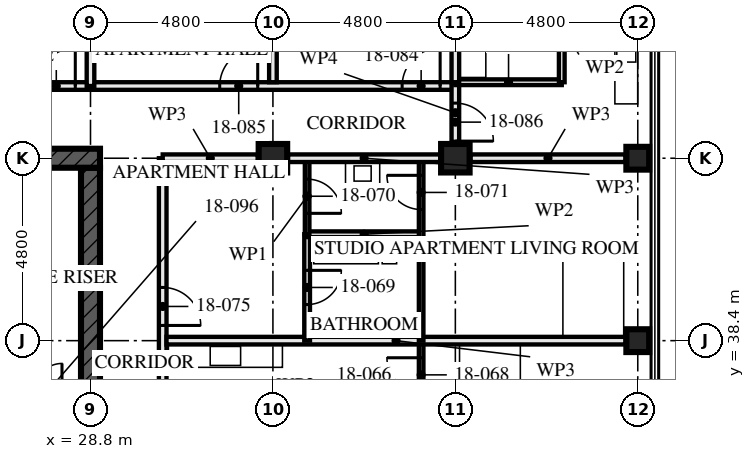
"""IFC4 building model, lengths in metres.
Left out: names, types, materials, properties, quantities, classifications, styles, units other than length and angle.
Written with IfcOpenShell. Run it as: python <this file> out.ifc"""

import sys

from ifc_helpers import new_model, si_unit, direction, frame, frame_2d, origin, origin_2d, place, context, subcontext, project, spatial, rectangle, hollow_rectangle, extrude, element, fill, save


model = new_model("IFC4")
c1 = context("Model", 3, precision=1e-05, world=origin(), true_north=direction((0.0, 1.0)))
c2 = subcontext(c1, "Body", "Model", "MODEL_VIEW")
j1 = project(units=[si_unit("LENGTHUNIT", "METRE"), si_unit("PLANEANGLEUNIT", "RADIAN")], contexts=[c1])
p1 = place(None, origin())
s1 = spatial("IfcSite", under=j1, at=p1, CompositionType="ELEMENT")
p2 = place(p1, origin())
s2 = spatial("IfcBuilding", under=s1, at=p2, CompositionType="ELEMENT")
p3 = place(p2, frame((0.0, 0.0, 69.0)))
s3 = spatial("IfcBuildingStorey", under=s2, at=p3, CompositionType="ELEMENT", Elevation=69.0)
for number, where, z_axis, x_axis in (
    (1, (33.6, 43.2, 0.0), (0.0, 0.0, 1.0), (0.0, 1.0, 0.0)),
    (2, (38.4, 43.2, 0.0), (0.0, 0.0, 1.0), (0.0, 1.0, 0.0)),
):
    element("IfcColumn", number, at=place(p3, frame(where, z_axis=z_axis, x_axis=x_axis)), inside=s3, PredefinedType="COLUMN", context=c2, shape_type="SweptSolid", body=[
        extrude(hollow_rectangle(XDim=0.75, YDim=0.75, WallThickness=0.08, at=origin_2d()), origin(), (0.0, 0.0, 1.0), 3.5),
    ])
for number, where, z_axis, x_axis in (
    (3, (43.2, 38.4, 0.0), (0.0, 0.0, 1.0), (1.0, 0.0, 0.0)),
    (4, (43.2, 43.2, 0.0), (0.0, 0.0, 1.0), (0.0, 1.0, 0.0)),
):
    element("IfcColumn", number, at=place(p3, frame(where, z_axis=z_axis, x_axis=x_axis)), inside=s3, PredefinedType="COLUMN", context=c2, shape_type="SweptSolid", body=[
        extrude(hollow_rectangle(XDim=0.6, YDim=0.6, WallThickness=0.08, at=origin_2d()), origin(), (0.0, 0.0, 1.0), 3.5),
    ])
p4 = place(p3, frame((29.05, 43.2, -0.17), z_axis=(0.0, 0.0, 1.0), x_axis=(-1.0, 0.0, 0.0)))
e5 = element("IfcWall", 5, at=p4, inside=s3, PredefinedType="SHEAR", context=c2, shape_type="SweptSolid", body=[
    extrude(rectangle(XDim=14.9, YDim=0.5, at=frame_2d((7.45, 0.0))), origin(), (0.0, 0.0, 1.0), 3.5),
])
p5 = place(p4, frame((6.85, 0.0, 0.17)))
e6 = element("IfcOpeningElement", 6, at=p5, cuts=e5, PredefinedType="OPENING", context=c2, shape_type="SweptSolid", body=[
    extrude(rectangle(XDim=1.2, YDim=2.1, at=frame_2d((0.6, 1.05))), frame((0.0, 0.26, 0.0), z_axis=(0.0, -1.0, 0.0), x_axis=(1.0, 0.0, 0.0)), (0.0, 0.0, 1.0), 0.521),
])
p6 = place(p3, frame((28.8, 29.05, -0.17), z_axis=(0.0, 0.0, 1.0), x_axis=(0.0, 1.0, 0.0)))
e7 = element("IfcWall", 7, at=p6, inside=s3, PredefinedType="SHEAR", context=c2, shape_type="SweptSolid", body=[
    extrude(rectangle(XDim=13.9, YDim=0.5, at=frame_2d((6.95, 0.0))), origin(), (0.0, 0.0, 1.0), 3.5),
])
p7 = place(p6, frame((6.35, 0.0, 0.17)))
e8 = element("IfcOpeningElement", 8, at=p7, cuts=e7, PredefinedType="OPENING", context=c2, shape_type="SweptSolid", body=[
    extrude(rectangle(XDim=1.2, YDim=2.1, at=frame_2d((0.6, 1.05))), frame((0.0, 0.26, 0.0), z_axis=(0.0, -1.0, 0.0), x_axis=(1.0, 0.0, 0.0)), (0.0, 0.0, 1.0), 0.521),
])
p8 = place(p3, frame((28.8, 45.1, 0.0), z_axis=(0.0, 0.0, 1.0), x_axis=(-1.0, 0.0, 0.0)))
e9 = element("IfcWall", 9, at=p8, inside=s3, PredefinedType="PARTITIONING", context=c2, shape_type="SweptSolid", body=[
    extrude(rectangle(XDim=14.4, YDim=0.2, at=frame_2d((7.2, 0.0))), origin(), (0.0, 0.0, 1.0), 3.33),
])
p9 = place(p8, frame((0.4, 0.0, 0.0)))
e10 = element("IfcOpeningElement", 10, at=p9, cuts=e9, PredefinedType="OPENING", context=c2, shape_type="SweptSolid", body=[
    extrude(rectangle(XDim=1.0, YDim=2.1, at=frame_2d((0.5, 1.05))), frame((0.0, 0.111, 0.0), z_axis=(0.0, -1.0, 0.0), x_axis=(1.0, 0.0, 0.0)), (0.0, 0.0, 1.0), 0.221),
])
p10 = place(p8, frame((5.2, 0.0, 0.0)))
e11 = element("IfcOpeningElement", 11, at=p10, cuts=e9, PredefinedType="OPENING", context=c2, shape_type="SweptSolid", body=[
    extrude(rectangle(XDim=1.0, YDim=2.1, at=frame_2d((0.5, 1.05))), frame((0.0, 0.111, 0.0), z_axis=(0.0, -1.0, 0.0), x_axis=(1.0, 0.0, 0.0)), (0.0, 0.0, 1.0), 0.221),
])
p11 = place(p8, frame((10.0, 0.0, 0.0)))
e12 = element("IfcOpeningElement", 12, at=p11, cuts=e9, PredefinedType="OPENING", context=c2, shape_type="SweptSolid", body=[
    extrude(rectangle(XDim=1.0, YDim=2.1, at=frame_2d((0.5, 1.05))), frame((0.0, 0.111, 0.0), z_axis=(0.0, -1.0, 0.0), x_axis=(1.0, 0.0, 0.0)), (0.0, 0.0, 1.0), 0.221),
])
p12 = place(p3, frame((37.5, 33.6, 0.0), z_axis=(0.0, 0.0, 1.0), x_axis=(0.0, 1.0, 0.0)))
e13 = element("IfcWall", 13, at=p12, inside=s3, PredefinedType="PARTITIONING", context=c2, shape_type="SweptSolid", body=[
    extrude(rectangle(XDim=4.8, YDim=0.12, at=frame_2d((2.4, 0.0))), origin(), (0.0, 0.0, 1.0), 3.33),
])
p13 = place(p12, frame((3.45, 0.0, 0.0)))
e14 = element("IfcOpeningElement", 14, at=p13, cuts=e13, PredefinedType="OPENING", context=c2, shape_type="SweptSolid", body=[
    extrude(rectangle(XDim=0.9, YDim=2.1, at=frame_2d((0.45, 1.05))), frame((0.0, 0.071, 0.0), z_axis=(0.0, -1.0, 0.0), x_axis=(1.0, 0.0, 0.0)), (0.0, 0.0, 1.0), 0.141),
])
p14 = place(p3, frame((42.88, 38.4, 0.0), z_axis=(0.0, 0.0, 1.0), x_axis=(-1.0, 0.0, 0.0)))
e15 = element("IfcWall", 15, at=p14, inside=s3, PredefinedType="PARTITIONING", context=c2, shape_type="SweptSolid", body=[
    extrude(rectangle(XDim=12.08, YDim=0.2, at=frame_2d((6.04, 0.0))), origin(), (0.0, 0.0, 1.0), 2.55),
])
p15 = place(p3, frame((37.5, 41.2, 0.0), z_axis=(0.0, 0.0, 1.0), x_axis=(-1.0, 0.0, 0.0)))
e16 = element("IfcWall", 16, at=p15, inside=s3, PredefinedType="PARTITIONING", context=c2, shape_type="SweptSolid", body=[
    extrude(rectangle(XDim=3.0, YDim=0.15, at=frame_2d((1.5, 0.0))), origin(), (0.0, 0.0, 1.0), 3.33),
])
p16 = place(p3, frame((34.5, 38.4, 0.0), z_axis=(0.0, 0.0, 1.0), x_axis=(0.0, 1.0, 0.0)))
e17 = element("IfcWall", 17, at=p16, inside=s3, PredefinedType="PARTITIONING", context=c2, shape_type="SweptSolid", body=[
    extrude(rectangle(XDim=2.8, YDim=0.15, at=frame_2d((1.4, 0.0))), origin(), (0.0, 0.0, 1.0), 3.33),
])
p17 = place(p16, frame((0.95, 0.0, 0.0)))
e18 = element("IfcOpeningElement", 18, at=p17, cuts=e17, PredefinedType="OPENING", context=c2, shape_type="SweptSolid", body=[
    extrude(rectangle(XDim=0.9, YDim=2.1, at=frame_2d((0.45, 1.05))), frame((0.0, 0.085, 0.0), z_axis=(0.0, -1.0, 0.0), x_axis=(1.0, 0.0, 0.0)), (0.0, 0.0, 1.0), 0.171),
])
p18 = place(p3, frame((34.5, 41.2, 0.0), z_axis=(0.0, 0.0, 1.0), x_axis=(0.0, 1.0, 0.0)))
e19 = element("IfcWall", 19, at=p18, inside=s3, PredefinedType="PARTITIONING", context=c2, shape_type="SweptSolid", body=[
    extrude(rectangle(XDim=2.0, YDim=0.12, at=frame_2d((1.0, 0.0))), origin(), (0.0, 0.0, 1.0), 3.33),
])
p19 = place(p18, frame((0.55, 0.0, 0.0)))
e20 = element("IfcOpeningElement", 20, at=p19, cuts=e19, PredefinedType="OPENING", context=c2, shape_type="SweptSolid", body=[
    extrude(rectangle(XDim=0.9, YDim=2.1, at=frame_2d((0.45, 1.05))), frame((0.0, 0.071, 0.0), z_axis=(0.0, -1.0, 0.0), x_axis=(1.0, 0.0, 0.0)), (0.0, 0.0, 1.0), 0.141),
])
p20 = place(p3, frame((37.5, 38.4, 0.0), z_axis=(0.0, 0.0, 1.0), x_axis=(0.0, 1.0, 0.0)))
e21 = element("IfcWall", 21, at=p20, inside=s3, PredefinedType="PARTITIONING", context=c2, shape_type="SweptSolid", body=[
    extrude(rectangle(XDim=4.8, YDim=0.12, at=frame_2d((2.4, 0.0))), origin(), (0.0, 0.0, 1.0), 3.33),
])
p21 = place(p20, frame((3.45, 0.0, 0.0)))
e22 = element("IfcOpeningElement", 22, at=p21, cuts=e21, PredefinedType="OPENING", context=c2, shape_type="SweptSolid", body=[
    extrude(rectangle(XDim=0.9, YDim=2.1, at=frame_2d((0.45, 1.05))), frame((0.0, 0.071, 0.0), z_axis=(0.0, -1.0, 0.0), x_axis=(1.0, 0.0, 0.0)), (0.0, 0.0, 1.0), 0.141),
])
p22 = place(p3, frame((30.7, 28.8, 0.0), z_axis=(0.0, 0.0, 1.0), x_axis=(0.0, 1.0, 0.0)))
e23 = element("IfcWall", 23, at=p22, inside=s3, PredefinedType="PARTITIONING", context=c2, shape_type="SweptSolid", body=[
    extrude(rectangle(XDim=14.4, YDim=0.2, at=frame_2d((7.2, 0.0))), origin(), (0.0, 0.0, 1.0), 2.55),
])
p23 = place(p22, frame((1.4, 0.0, 0.0)))
e24 = element("IfcOpeningElement", 24, at=p23, cuts=e23, PredefinedType="OPENING", context=c2, shape_type="SweptSolid", body=[
    extrude(rectangle(XDim=1.0, YDim=2.1, at=frame_2d((0.5, 1.05))), frame((0.0, 0.111, 0.0), z_axis=(0.0, -1.0, 0.0), x_axis=(1.0, 0.0, 0.0)), (0.0, 0.0, 1.0), 0.221),
])
p24 = place(p22, frame((4.1, 0.0, 0.0)))
e25 = element("IfcOpeningElement", 25, at=p24, cuts=e23, PredefinedType="OPENING", context=c2, shape_type="SweptSolid", body=[
    extrude(rectangle(XDim=1.0, YDim=2.1, at=frame_2d((0.5, 1.05))), frame((0.0, 0.111, 0.0), z_axis=(0.0, -1.0, 0.0), x_axis=(1.0, 0.0, 0.0)), (0.0, 0.0, 1.0), 0.221),
])
p25 = place(p22, frame((5.975, 0.0, 0.0)))
e26 = element("IfcOpeningElement", 26, at=p25, cuts=e23, PredefinedType="OPENING", context=c2, shape_type="SweptSolid", body=[
    extrude(rectangle(XDim=1.0, YDim=2.1, at=frame_2d((0.5, 1.05))), frame((0.0, 0.111, 0.0), z_axis=(0.0, -1.0, 0.0), x_axis=(1.0, 0.0, 0.0)), (0.0, 0.0, 1.0), 0.221),
])
p26 = place(p22, frame((10.0, 0.0, 0.0)))
e27 = element("IfcOpeningElement", 27, at=p26, cuts=e23, PredefinedType="OPENING", context=c2, shape_type="SweptSolid", body=[
    extrude(rectangle(XDim=1.0, YDim=2.1, at=frame_2d((0.5, 1.05))), frame((0.0, 0.111, 0.0), z_axis=(0.0, -1.0, 0.0), x_axis=(1.0, 0.0, 0.0)), (0.0, 0.0, 1.0), 0.221),
])
p27 = place(p3, frame((41.2, 48.2, 0.0), z_axis=(0.0, 0.0, 1.0), x_axis=(0.0, -1.0, 0.0)))
e28 = element("IfcWall", 28, at=p27, inside=s3, PredefinedType="PARTITIONING", context=c2, shape_type="SweptSolid", body=[
    extrude(rectangle(XDim=3.0, YDim=0.15, at=frame_2d((1.5, 0.0))), origin(), (0.0, 0.0, 1.0), 2.55),
])
p28 = place(p27, frame((1.05, 0.0, 0.0)))
e29 = element("IfcOpeningElement", 29, at=p28, cuts=e28, PredefinedType="OPENING", context=c2, shape_type="SweptSolid", body=[
    extrude(rectangle(XDim=0.9, YDim=2.1, at=frame_2d((0.45, 1.05))), frame((0.0, 0.085, 0.0), z_axis=(0.0, -1.0, 0.0), x_axis=(1.0, 0.0, 0.0)), (0.0, 0.0, 1.0), 0.171),
])
p29 = place(p3, frame((41.2, 45.2, 0.0), z_axis=(0.0, 0.0, 1.0), x_axis=(-1.0, 0.0, 0.0)))
e30 = element("IfcWall", 30, at=p29, inside=s3, PredefinedType="PARTITIONING", context=c2, shape_type="SweptSolid", body=[
    extrude(rectangle(XDim=2.8, YDim=0.15, at=frame_2d((1.4, 0.0))), origin(), (0.0, 0.0, 1.0), 3.33),
])
p30 = place(p3, frame((38.4, 52.48, 0.0), z_axis=(0.0, 0.0, 1.0), x_axis=(0.0, -1.0, 0.0)))
e31 = element("IfcWall", 31, at=p30, inside=s3, PredefinedType="PARTITIONING", context=c2, shape_type="SweptSolid", body=[
    extrude(rectangle(XDim=7.28, YDim=0.2, at=frame_2d((3.64, 0.0))), origin(), (0.0, 0.0, 1.0), 2.55),
])
p31 = place(p3, frame((33.6, 57.28, 0.0), z_axis=(0.0, 0.0, 1.0), x_axis=(0.0, -1.0, 0.0)))
e32 = element("IfcWall", 32, at=p31, inside=s3, PredefinedType="PARTITIONING", context=c2, shape_type="SweptSolid", body=[
    extrude(rectangle(XDim=12.08, YDim=0.2, at=frame_2d((6.04, 0.0))), origin(), (0.0, 0.0, 1.0), 2.55),
])
p32 = place(p3, frame((38.4, 45.1, 0.0), z_axis=(0.0, 0.0, 1.0), x_axis=(-1.0, 0.0, 0.0)))
e33 = element("IfcWall", 33, at=p32, inside=s3, PredefinedType="PARTITIONING", context=c2, shape_type="SweptSolid", body=[
    extrude(rectangle(XDim=9.6, YDim=0.2, at=frame_2d((4.8, 0.0))), origin(), (0.0, 0.0, 1.0), 3.33),
])
p33 = place(p32, frame((0.4, 0.0, 0.0)))
e34 = element("IfcOpeningElement", 34, at=p33, cuts=e33, PredefinedType="OPENING", context=c2, shape_type="SweptSolid", body=[
    extrude(rectangle(XDim=1.0, YDim=2.1, at=frame_2d((0.5, 1.05))), frame((0.0, 0.111, 0.0), z_axis=(0.0, -1.0, 0.0), x_axis=(1.0, 0.0, 0.0)), (0.0, 0.0, 1.0), 0.221),
])
p34 = place(p32, frame((5.2, 0.0, 0.0)))
e35 = element("IfcOpeningElement", 35, at=p34, cuts=e33, PredefinedType="OPENING", context=c2, shape_type="SweptSolid", body=[
    extrude(rectangle(XDim=1.0, YDim=2.1, at=frame_2d((0.5, 1.05))), frame((0.0, 0.111, 0.0), z_axis=(0.0, -1.0, 0.0), x_axis=(1.0, 0.0, 0.0)), (0.0, 0.0, 1.0), 0.221),
])
p35 = place(p3, frame((38.4, 45.2, 0.0), z_axis=(0.0, 0.0, 1.0), x_axis=(0.0, -1.0, 0.0)))
e36 = element("IfcWall", 36, at=p35, inside=s3, PredefinedType="PARTITIONING", context=c2, shape_type="SweptSolid", body=[
    extrude(rectangle(XDim=1.605, YDim=0.2, at=frame_2d((0.802, 0.0))), origin(), (0.0, 0.0, 1.0), 3.33),
])
p36 = place(p35, frame((0.55, 0.0, 0.0)))
e37 = element("IfcOpeningElement", 37, at=p36, cuts=e36, PredefinedType="OPENING", context=c2, shape_type="SweptSolid", body=[
    extrude(rectangle(XDim=1.0, YDim=2.1, at=frame_2d((0.5, 1.05))), frame((0.0, 0.111, 0.0), z_axis=(0.0, -1.0, 0.0), x_axis=(1.0, 0.0, 0.0)), (0.0, 0.0, 1.0), 0.221),
])
p37 = place(p3, frame((28.8, 45.1, 0.0), z_axis=(0.0, 0.0, 1.0), x_axis=(0.0, 1.0, 0.0)))
e38 = element("IfcWall", 38, at=p37, inside=s3, PredefinedType="PARTITIONING", context=c2, shape_type="SweptSolid", body=[
    extrude(rectangle(XDim=2.555, YDim=0.2, at=frame_2d((1.277, 0.0))), origin(), (0.0, 0.0, 1.0), 2.32),
])
p38 = place(p3, frame((42.88, 43.2, 0.0), z_axis=(0.0, 0.0, 1.0), x_axis=(-1.0, 0.0, 0.0)))
e39 = element("IfcWall", 39, at=p38, inside=s3, PredefinedType="PARTITIONING", context=c2, shape_type="SweptSolid", body=[
    extrude(rectangle(XDim=4.085, YDim=0.2, at=frame_2d((2.042, 0.0))), origin(), (0.0, 0.0, 1.0), 2.32),
])
p39 = place(p3, frame((38.005, 43.2, 0.0), z_axis=(0.0, 0.0, 1.0), x_axis=(-1.0, 0.0, 0.0)))
e40 = element("IfcWall", 40, at=p39, inside=s3, PredefinedType="PARTITIONING", context=c2, shape_type="SweptSolid", body=[
    extrude(rectangle(XDim=4.01, YDim=0.2, at=frame_2d((2.005, 0.0))), origin(), (0.0, 0.0, 1.0), 2.32),
])
p40 = place(p3, frame((33.205, 43.2, 0.0), z_axis=(0.0, 0.0, 1.0), x_axis=(-1.0, 0.0, 0.0)))
e41 = element("IfcWall", 41, at=p40, inside=s3, PredefinedType="PARTITIONING", context=c2, shape_type="SweptSolid", body=[
    extrude(rectangle(XDim=2.505, YDim=0.2, at=frame_2d((1.252, 0.0))), origin(), (0.0, 0.0, 1.0), 2.32),
])
p41 = place(p9, frame((1.0, 0.0, 0.0), z_axis=(0.0, 0.0, 1.0), x_axis=(-1.0, 0.0, 0.0)))
e42 = element("IfcDoor", 42, at=p41, inside=s3, OperationType="SINGLE_SWING_LEFT", PredefinedType="DOOR", context=c2, shape_type="SweptSolid", body=[
    extrude(rectangle(XDim=1.0, YDim=2.1, at=frame_2d((0.5, 1.05))), frame((0.0, 0.027, 0.0), z_axis=(0.0, -1.0, 0.0), x_axis=(1.0, 0.0, 0.0)), (0.0, 0.0, 1.0), 0.054),
])
fill(e10, e42)
p42 = place(p13, origin())
e43 = element("IfcDoor", 43, at=p42, inside=s3, OperationType="SINGLE_SWING_LEFT", PredefinedType="DOOR", context=c2, shape_type="SweptSolid", body=[
    extrude(rectangle(XDim=0.9, YDim=2.1, at=frame_2d((0.45, 1.05))), frame((0.0, 0.022, 0.0), z_axis=(0.0, -1.0, 0.0), x_axis=(1.0, 0.0, 0.0)), (0.0, 0.0, 1.0), 0.044),
])
fill(e14, e43)
p43 = place(p17, frame((0.9, 0.0, 0.0), z_axis=(0.0, 0.0, 1.0), x_axis=(-1.0, 0.0, 0.0)))
e44 = element("IfcDoor", 44, at=p43, inside=s3, OperationType="SINGLE_SWING_RIGHT", PredefinedType="DOOR", context=c2, shape_type="SweptSolid", body=[
    extrude(rectangle(XDim=0.9, YDim=2.1, at=frame_2d((0.45, 1.05))), frame((0.0, 0.022, 0.0), z_axis=(0.0, -1.0, 0.0), x_axis=(1.0, 0.0, 0.0)), (0.0, 0.0, 1.0), 0.044),
])
fill(e18, e44)
p44 = place(p19, frame((0.9, 0.0, 0.0), z_axis=(0.0, 0.0, 1.0), x_axis=(-1.0, 0.0, 0.0)))
e45 = element("IfcDoor", 45, at=p44, inside=s3, OperationType="SINGLE_SWING_LEFT", PredefinedType="DOOR", context=c2, shape_type="SweptSolid", body=[
    extrude(rectangle(XDim=0.9, YDim=2.1, at=frame_2d((0.45, 1.05))), frame((0.0, 0.022, 0.0), z_axis=(0.0, -1.0, 0.0), x_axis=(1.0, 0.0, 0.0)), (0.0, 0.0, 1.0), 0.044),
])
fill(e20, e45)
p45 = place(p21, origin())
e46 = element("IfcDoor", 46, at=p45, inside=s3, OperationType="SINGLE_SWING_LEFT", PredefinedType="DOOR", context=c2, shape_type="SweptSolid", body=[
    extrude(rectangle(XDim=0.9, YDim=2.1, at=frame_2d((0.45, 1.05))), frame((0.0, 0.022, 0.0), z_axis=(0.0, -1.0, 0.0), x_axis=(1.0, 0.0, 0.0)), (0.0, 0.0, 1.0), 0.044),
])
fill(e22, e46)
p46 = place(p26, frame((1.0, 0.0, 0.0), z_axis=(0.0, 0.0, 1.0), x_axis=(-1.0, 0.0, 0.0)))
e47 = element("IfcDoor", 47, at=p46, inside=s3, OperationType="SINGLE_SWING_LEFT", PredefinedType="DOOR", context=c2, shape_type="SweptSolid", body=[
    extrude(rectangle(XDim=1.0, YDim=2.1, at=frame_2d((0.5, 1.05))), frame((0.0, 0.027, 0.0), z_axis=(0.0, -1.0, 0.0), x_axis=(1.0, 0.0, 0.0)), (0.0, 0.0, 1.0), 0.054),
])
fill(e27, e47)
p47 = place(p33, frame((1.0, 0.0, 0.0), z_axis=(0.0, 0.0, 1.0), x_axis=(-1.0, 0.0, 0.0)))
e48 = element("IfcDoor", 48, at=p47, inside=s3, OperationType="SINGLE_SWING_LEFT", PredefinedType="DOOR", context=c2, shape_type="SweptSolid", body=[
    extrude(rectangle(XDim=1.0, YDim=2.1, at=frame_2d((0.5, 1.05))), frame((0.0, 0.027, 0.0), z_axis=(0.0, -1.0, 0.0), x_axis=(1.0, 0.0, 0.0)), (0.0, 0.0, 1.0), 0.054),
])
fill(e34, e48)
p48 = place(p34, frame((1.0, 0.0, 0.0), z_axis=(0.0, 0.0, 1.0), x_axis=(-1.0, 0.0, 0.0)))
e49 = element("IfcDoor", 49, at=p48, inside=s3, OperationType="SINGLE_SWING_LEFT", PredefinedType="DOOR", context=c2, shape_type="SweptSolid", body=[
    extrude(rectangle(XDim=1.0, YDim=2.1, at=frame_2d((0.5, 1.05))), frame((0.0, 0.027, 0.0), z_axis=(0.0, -1.0, 0.0), x_axis=(1.0, 0.0, 0.0)), (0.0, 0.0, 1.0), 0.054),
])
fill(e35, e49)
p49 = place(p36, origin())
e50 = element("IfcDoor", 50, at=p49, inside=s3, OperationType="SINGLE_SWING_LEFT", PredefinedType="DOOR", context=c2, shape_type="SweptSolid", body=[
    extrude(rectangle(XDim=1.0, YDim=2.1, at=frame_2d((0.5, 1.05))), frame((0.0, 0.027, 0.0), z_axis=(0.0, -1.0, 0.0), x_axis=(1.0, 0.0, 0.0)), (0.0, 0.0, 1.0), 0.054),
])
fill(e37, e50)
save(model, sys.argv[1])
